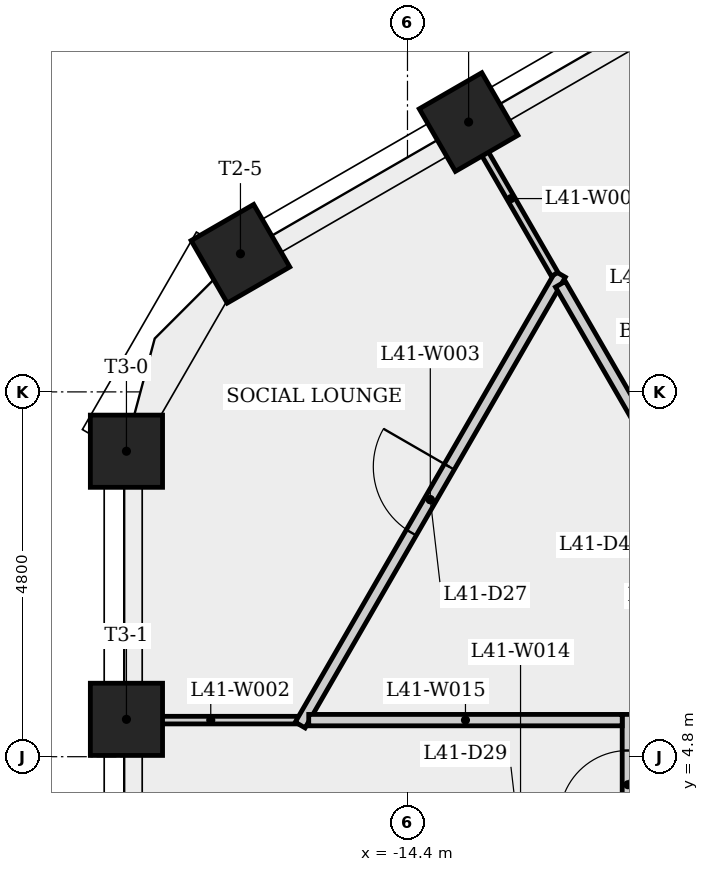
"""IFC4 building model, lengths in metres.
Left out: names, types, materials, properties, quantities, classifications, styles, units other than length and angle.
Written with IfcOpenShell. Run it as: python <this file> out.ifc"""

import sys

from ifc_helpers import new_model, si_unit, direction, frame, frame_2d, origin, origin_2d, place, context, subcontext, project, spatial, rectangle, extrude, element, fill, save


model = new_model("IFC4")
c1 = context("Model", 3, precision=1e-05, world=origin(), true_north=direction((0.0, 1.0)))
c2 = subcontext(c1, "Body", "Model", "MODEL_VIEW")
j1 = project(units=[si_unit("LENGTHUNIT", "METRE"), si_unit("PLANEANGLEUNIT", "RADIAN")], contexts=[c1])
p1 = place(None, origin())
s1 = spatial("IfcSite", under=j1, at=p1, CompositionType="ELEMENT")
p2 = place(p1, origin())
s2 = spatial("IfcBuilding", under=s1, at=p2, CompositionType="ELEMENT")
p3 = place(p2, frame((0.0, 0.0, 156.1)))
s3 = spatial("IfcBuildingStorey", under=s2, at=p3, CompositionType="ELEMENT", Elevation=156.1)
for number, where, z_axis, x_axis in (
    (1, (-13.596, 13.15, 0.0), (0.0, 0.0, 1.0), (-0.5, 0.866, 0.0)),
    (2, (-16.597, 11.417, 0.0), (0.0, 0.0, 1.0), (-0.5, 0.866, 0.0)),
    (3, (-18.097, 8.819, 0.0), (0.0, 0.0, 1.0), (-1.0, 0.0, 0.0)),
    (4, (-18.097, 5.292, 0.0), (0.0, 0.0, 1.0), (-1.0, 0.0, 0.0)),
):
    element("IfcColumn", number, at=place(p3, frame(where, z_axis=z_axis, x_axis=x_axis)), inside=s3, PredefinedType="COLUMN", context=c2, shape_type="SweptSolid", body=[
        extrude(rectangle(XDim=0.95, YDim=0.95, at=origin_2d()), origin(), (0.0, 0.0, 1.0), 3.4),
    ])
p4 = place(p3, frame((-15.849, 5.281, 0.0), z_axis=(0.0, 0.0, 1.0), x_axis=(-1.0, 0.0, 0.0)))
e5 = element("IfcWall", 5, at=p4, inside=s3, PredefinedType="PARTITIONING", context=c2, shape_type="SweptSolid", body=[
    extrude(rectangle(XDim=2.278, YDim=0.1, at=frame_2d((1.139, 0.0))), origin(), (0.0, 0.0, 1.0), 3.05),
])
p5 = place(p3, frame((-15.812, 5.216, 0.0), z_axis=(0.0, 0.0, 1.0), x_axis=(0.50000019414, 0.866025291697, 0.0)))
e6 = element("IfcWall", 6, at=p5, inside=s3, PredefinedType="PARTITIONING", context=c2, shape_type="SweptSolid", body=[
    extrude(rectangle(XDim=6.848, YDim=0.15, at=frame_2d((3.424, 0.0))), origin(), (0.0, 0.0, 1.0), 3.05),
])
p6 = place(p5, frame((2.924, 0.0, 0.0)))
e7 = element("IfcOpeningElement", 7, at=p6, cuts=e6, PredefinedType="OPENING", context=c2, shape_type="SweptSolid", body=[
    extrude(rectangle(XDim=1.0, YDim=2.1, at=frame_2d((0.5, 1.05))), frame((0.0, 0.085, 0.0), z_axis=(0.0, -1.0, 0.0), x_axis=(1.0, 0.0, 0.0)), (0.0, 0.0, 1.0), 0.17),
])
p7 = place(p3, frame((-13.614, 13.14, 0.0), z_axis=(0.0, 0.0, 1.0), x_axis=(0.49996120575, -0.866047800497, 0.0)))
e8 = element("IfcWall", 8, at=p7, inside=s3, PredefinedType="PARTITIONING", context=c2, shape_type="SweptSolid", body=[
    extrude(rectangle(XDim=2.302, YDim=0.1, at=frame_2d((1.151, 0.0))), origin(), (0.0, 0.0, 1.0), 3.05),
])
p8 = place(p3, frame((-12.388, 11.017, 0.0), z_axis=(0.0, 0.0, 1.0), x_axis=(0.499962338254, -0.866047146712, 0.0)))
e9 = element("IfcWall", 9, at=p8, inside=s3, PredefinedType="PARTITIONING", context=c2, shape_type="SweptSolid", body=[
    extrude(rectangle(XDim=5.11, YDim=0.15, at=frame_2d((2.555, 0.0))), origin(), (0.0, 0.0, 1.0), 3.05),
])
p9 = place(p8, frame((2.067, 0.0, 0.0)))
e10 = element("IfcOpeningElement", 10, at=p9, cuts=e9, PredefinedType="OPENING", context=c2, shape_type="SweptSolid", body=[
    extrude(rectangle(XDim=0.9, YDim=2.1, at=frame_2d((0.45, 1.05))), frame((0.0, 0.085, 0.0), z_axis=(0.0, -1.0, 0.0), x_axis=(1.0, 0.0, 0.0)), (0.0, 0.0, 1.0), 0.17),
])
p10 = place(p3, frame((-11.5, -5.206, 0.0), z_axis=(0.0, 0.0, 1.0), x_axis=(0.0, 1.0, 0.0)))
e11 = element("IfcWall", 11, at=p10, inside=s3, PredefinedType="PARTITIONING", context=c2, shape_type="SweptSolid", body=[
    extrude(rectangle(XDim=10.562, YDim=0.15, at=frame_2d((5.281, 0.0))), origin(), (0.0, 0.0, 1.0), 3.05),
])
p11 = place(p10, frame((9.188, 0.0, 0.0)))
e12 = element("IfcOpeningElement", 12, at=p11, cuts=e11, PredefinedType="OPENING", context=c2, shape_type="SweptSolid", body=[
    extrude(rectangle(XDim=0.9, YDim=2.1, at=frame_2d((0.45, 1.05))), frame((0.0, 0.085, 0.0), z_axis=(0.0, -1.0, 0.0), x_axis=(1.0, 0.0, 0.0)), (0.0, 0.0, 1.0), 0.17),
])
p12 = place(p10, frame((2.969, 0.0, 0.0)))
e13 = element("IfcOpeningElement", 13, at=p12, cuts=e11, PredefinedType="OPENING", context=c2, shape_type="SweptSolid", body=[
    extrude(rectangle(XDim=1.0, YDim=2.1, at=frame_2d((0.5, 1.05))), frame((0.0, 0.085, 0.0), z_axis=(0.0, -1.0, 0.0), x_axis=(1.0, 0.0, 0.0)), (0.0, 0.0, 1.0), 0.17),
])
p13 = place(p3, frame((-11.575, 5.281, 0.0), z_axis=(0.0, 0.0, 1.0), x_axis=(-1.0, 0.0, 0.0)))
e14 = element("IfcWall", 14, at=p13, inside=s3, PredefinedType="PARTITIONING", context=c2, shape_type="SweptSolid", body=[
    extrude(rectangle(XDim=4.124, YDim=0.15, at=frame_2d((2.062, 0.0))), origin(), (0.0, 0.0, 1.0), 3.05),
])
p14 = place(p6, origin())
e15 = element("IfcDoor", 15, at=p14, inside=s3, OperationType="SINGLE_SWING_RIGHT", PredefinedType="DOOR", context=c2, shape_type="SweptSolid", body=[
    extrude(rectangle(XDim=1.0, YDim=2.1, at=frame_2d((0.5, 1.05))), frame((0.0, 0.025, 0.0), z_axis=(0.0, -1.0, 0.0), x_axis=(1.0, 0.0, 0.0)), (0.0, 0.0, 1.0), 0.05),
])
fill(e7, e15)
p15 = place(p11, origin())
e16 = element("IfcDoor", 16, at=p15, inside=s3, OperationType="SINGLE_SWING_LEFT", PredefinedType="DOOR", context=c2, shape_type="SweptSolid", body=[
    extrude(rectangle(XDim=0.9, YDim=2.1, at=frame_2d((0.45, 1.05))), frame((0.0, 0.025, 0.0), z_axis=(0.0, -1.0, 0.0), x_axis=(1.0, 0.0, 0.0)), (0.0, 0.0, 1.0), 0.05),
])
fill(e12, e16)
save(model, sys.argv[1])
